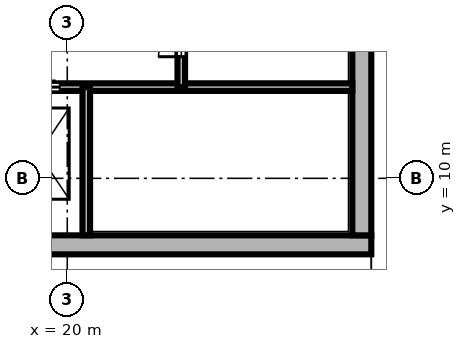
"""IFC4 building model, lengths in metres.
Left out: names, types, materials, properties, quantities, classifications, styles, units other than length and angle.
Written with IfcOpenShell. Run it as: python <this file> out.ifc"""

import sys

from ifc_helpers import new_model, si_unit, direction, frame, frame_2d, origin, place, context, subcontext, project, spatial, rectangle, extrude, element, fill, save


model = new_model("IFC4")
c1 = context("Model", 3, precision=1e-05, world=origin(), true_north=direction((0.0, 1.0)))
c2 = subcontext(c1, "Body", "Model", "MODEL_VIEW")
j1 = project(units=[si_unit("LENGTHUNIT", "METRE"), si_unit("PLANEANGLEUNIT", "RADIAN")], contexts=[c1])
p1 = place(None, origin())
s1 = spatial("IfcSite", under=j1, at=p1, CompositionType="ELEMENT")
p2 = place(p1, origin())
s2 = spatial("IfcBuilding", under=s1, at=p2, CompositionType="ELEMENT")
p3 = place(p2, frame((0.0, 0.0, 358.2)))
s3 = spatial("IfcBuildingStorey", under=s2, at=p3, CompositionType="ELEMENT", Elevation=358.2)
p4 = place(p3, frame((8.0, 8.25, 0.0), z_axis=(0.0, 0.0, 1.0), x_axis=(1.0, 0.0, 0.0)))
e1 = element("IfcWall", 1, at=p4, inside=s3, PredefinedType="SHEAR", context=c2, shape_type="SweptSolid", body=[
    extrude(rectangle(XDim=20.0, YDim=0.5, at=frame_2d((10.0, 0.0))), origin(), (0.0, 0.0, 1.0), 7.2),
])
p5 = place(p3, frame((27.75, 8.5, 0.0), z_axis=(0.0, 0.0, 1.0), x_axis=(0.0, 1.0, 0.0)))
e2 = element("IfcWall", 2, at=p5, inside=s3, PredefinedType="SHEAR", context=c2, shape_type="SweptSolid", body=[
    extrude(rectangle(XDim=19.0, YDim=0.5, at=frame_2d((9.5, 0.0))), origin(), (0.0, 0.0, 1.0), 7.2),
])
p6 = place(p5, frame((4.95, 0.0, 0.0)))
e3 = element("IfcOpeningElement", 3, at=p6, cuts=e2, PredefinedType="OPENING", context=c2, shape_type="SweptSolid", body=[
    extrude(rectangle(XDim=1.6, YDim=2.1, at=frame_2d((0.8, 1.05))), frame((0.0, 0.26, 0.0), z_axis=(0.0, -1.0, 0.0), x_axis=(1.0, 0.0, 0.0)), (0.0, 0.0, 1.0), 0.52),
])
p7 = place(p3, frame((13.8, 12.4, 0.0), z_axis=(0.0, 0.0, 1.0), x_axis=(1.0, 0.0, 0.0)))
e4 = element("IfcWall", 4, at=p7, inside=s3, PredefinedType="SHEAR", context=c2, shape_type="SweptSolid", body=[
    extrude(rectangle(XDim=13.7, YDim=0.2, at=frame_2d((6.85, 0.0))), origin(), (0.0, 0.0, 1.0), 6.75),
])
p8 = place(p7, frame((2.4, 0.0, 0.0)))
e5 = element("IfcOpeningElement", 5, at=p8, cuts=e4, PredefinedType="OPENING", context=c2, shape_type="SweptSolid", body=[
    extrude(rectangle(XDim=1.1, YDim=2.1, at=frame_2d((0.55, 1.05))), frame((0.0, 0.11, 0.0), z_axis=(0.0, -1.0, 0.0), x_axis=(1.0, 0.0, 0.0)), (0.0, 0.0, 1.0), 0.22),
])
p9 = place(p7, frame((4.9, 0.0, 0.0)))
e6 = element("IfcOpeningElement", 6, at=p9, cuts=e4, PredefinedType="OPENING", context=c2, shape_type="SweptSolid", body=[
    extrude(rectangle(XDim=1.1, YDim=2.1, at=frame_2d((0.55, 1.05))), frame((0.0, 0.11, 0.0), z_axis=(0.0, -1.0, 0.0), x_axis=(1.0, 0.0, 0.0)), (0.0, 0.0, 1.0), 0.22),
])
p10 = place(p7, frame((0.15, 0.0, 0.0)))
e7 = element("IfcOpeningElement", 7, at=p10, cuts=e4, PredefinedType="OPENING", context=c2, shape_type="SweptSolid", body=[
    extrude(rectangle(XDim=1.0, YDim=2.1, at=frame_2d((0.5, 1.05))), frame((0.0, 0.11, 0.0), z_axis=(0.0, -1.0, 0.0), x_axis=(1.0, 0.0, 0.0)), (0.0, 0.0, 1.0), 0.22),
])
p11 = place(p3, frame((20.5, 8.5, 0.0), z_axis=(0.0, 0.0, 1.0), x_axis=(0.0, 1.0, 0.0)))
e8 = element("IfcWall", 8, at=p11, inside=s3, PredefinedType="SHEAR", context=c2, shape_type="SweptSolid", body=[
    extrude(rectangle(XDim=3.9, YDim=0.2, at=frame_2d((1.95, 0.0))), origin(), (0.0, 0.0, 1.0), 6.75),
])
p12 = place(p3, frame((23.0, 12.4, 0.0), z_axis=(0.0, 0.0, 1.0), x_axis=(0.0, 1.0, 0.0)))
e9 = element("IfcWall", 9, at=p12, inside=s3, PredefinedType="SHEAR", context=c2, shape_type="SweptSolid", body=[
    extrude(rectangle(XDim=2.8, YDim=0.2, at=frame_2d((1.4, 0.0))), origin(), (0.0, 0.0, 1.0), 6.75),
])
p13 = place(p12, frame((0.8, 0.0, 0.0)))
e10 = element("IfcOpeningElement", 10, at=p13, cuts=e9, PredefinedType="OPENING", context=c2, shape_type="SweptSolid", body=[
    extrude(rectangle(XDim=1.2, YDim=2.1, at=frame_2d((0.6, 1.05))), frame((0.0, 0.11, 0.0), z_axis=(0.0, -1.0, 0.0), x_axis=(1.0, 0.0, 0.0)), (0.0, 0.0, 1.0), 0.22),
])
p14 = place(p9, origin())
e11 = element("IfcDoor", 11, at=p14, inside=s3, OperationType="DOUBLE_DOOR_SLIDING", PredefinedType="DOOR", context=c2, shape_type="SweptSolid", body=[
    extrude(rectangle(XDim=1.1, YDim=2.1, at=frame_2d((0.55, 1.05))), frame((0.0, 0.025, 0.0), z_axis=(0.0, -1.0, 0.0), x_axis=(1.0, 0.0, 0.0)), (0.0, 0.0, 1.0), 0.05),
])
fill(e6, e11)
p15 = place(p13, origin())
e12 = element("IfcDoor", 12, at=p15, inside=s3, OperationType="DOUBLE_DOOR_SINGLE_SWING", PredefinedType="DOOR", context=c2, shape_type="SweptSolid", body=[
    extrude(rectangle(XDim=1.2, YDim=2.1, at=frame_2d((0.6, 1.05))), frame((0.0, 0.025, 0.0), z_axis=(0.0, -1.0, 0.0), x_axis=(1.0, 0.0, 0.0)), (0.0, 0.0, 1.0), 0.05),
])
fill(e10, e12)
save(model, sys.argv[1])
